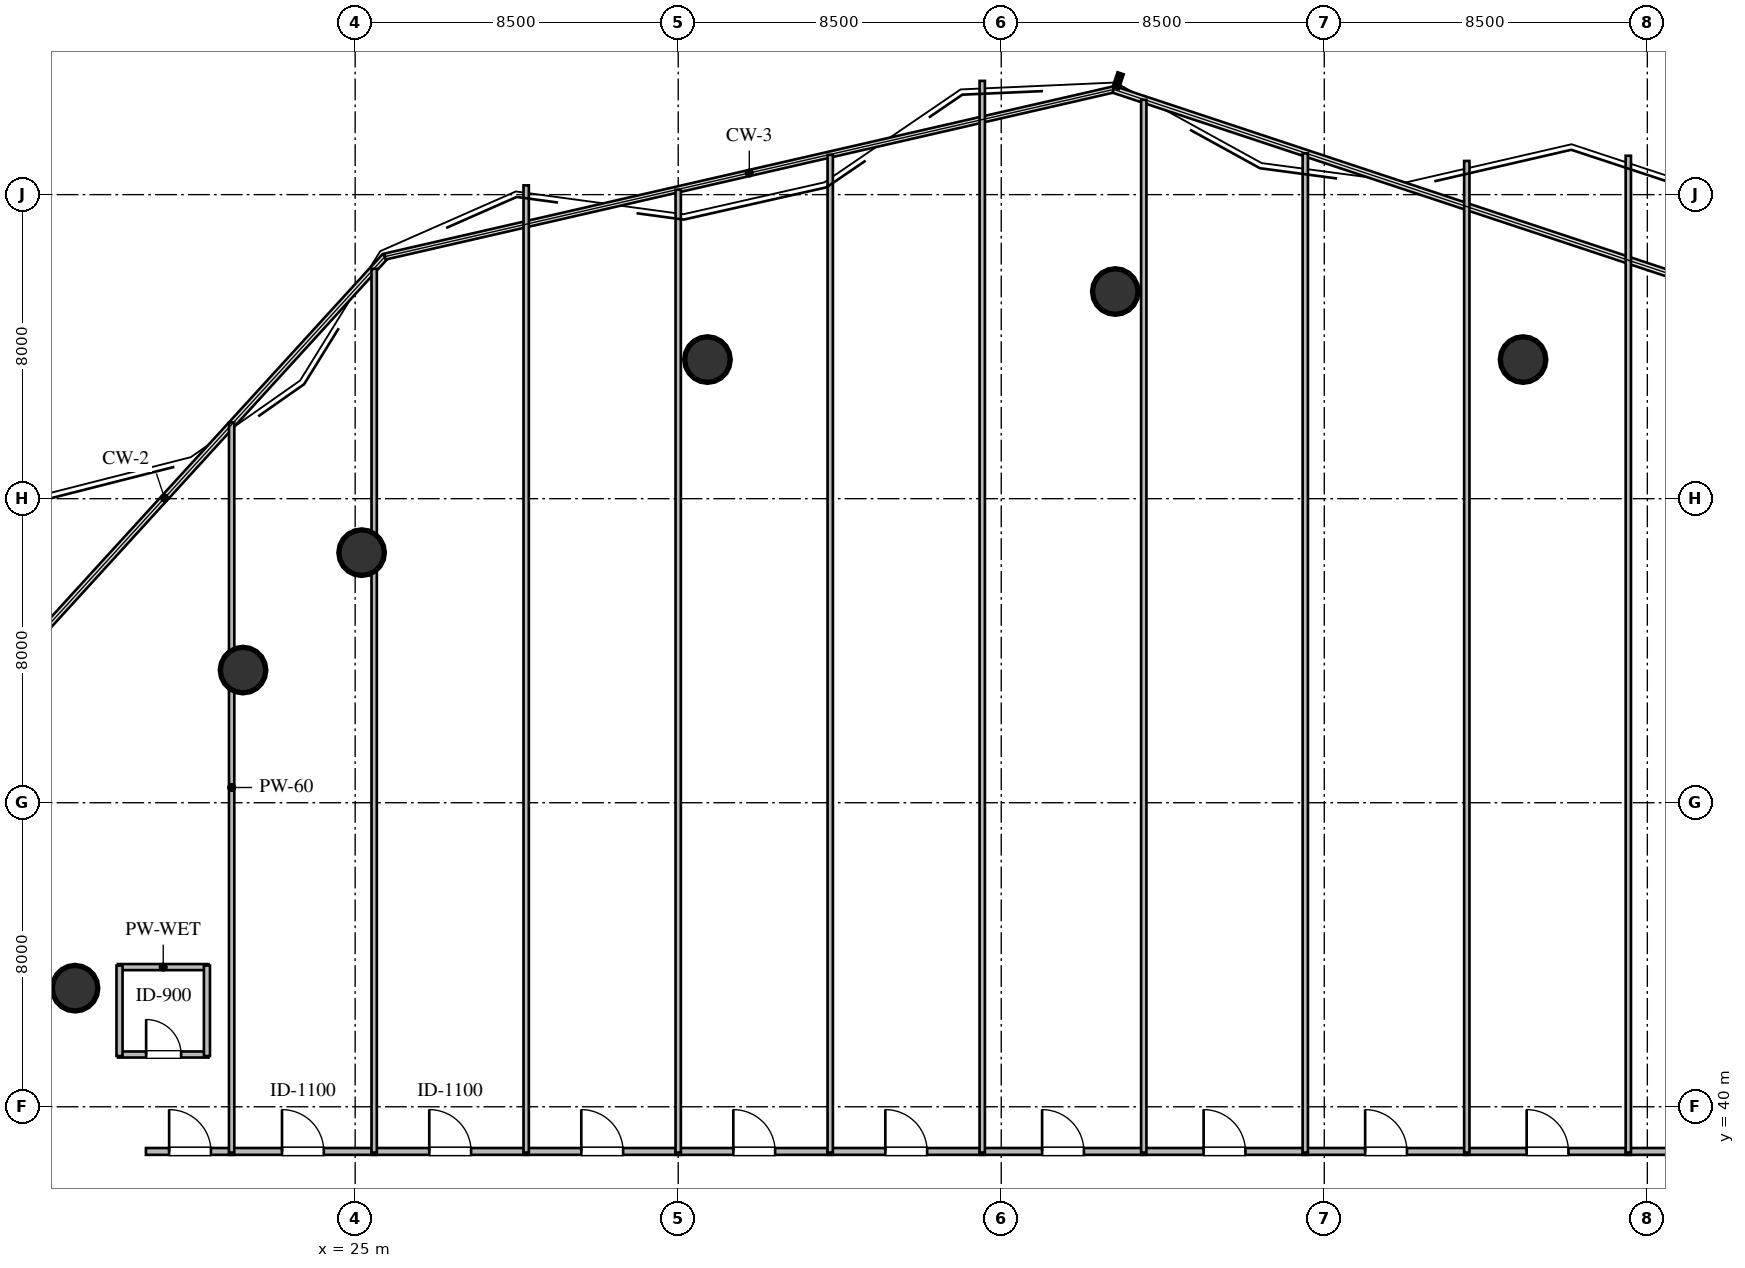
"""IFC4 building model, lengths in metres.
Left out: names, types, materials, properties, quantities, classifications, styles, units other than length and angle.
Written with IfcOpenShell. Run it as: python <this file> out.ifc"""

import sys

from ifc_helpers import new_model, si_unit, direction, frame, frame_2d, origin, origin_2d, place, context, subcontext, project, spatial, rectangle, circle, extrude, element, fill, save


model = new_model("IFC4")
c1 = context("Model", 3, precision=1e-05, world=origin(), true_north=direction((0.0, 1.0)))
c2 = subcontext(c1, "Body", "Model", "MODEL_VIEW")
j1 = project(units=[si_unit("LENGTHUNIT", "METRE"), si_unit("PLANEANGLEUNIT", "RADIAN")], contexts=[c1])
p1 = place(None, origin())
s1 = spatial("IfcSite", under=j1, at=p1, CompositionType="ELEMENT")
p2 = place(p1, origin())
s2 = spatial("IfcBuilding", under=s1, at=p2, CompositionType="ELEMENT")
p3 = place(p2, frame((0.0, 0.0, 163.8)))
s3 = spatial("IfcBuildingStorey", under=s2, at=p3, CompositionType="ELEMENT", Elevation=163.8)
for number, where, z_axis, x_axis in (
    (1, (55.73, 59.66, 0.0), (0.0, 0.0, 1.0), (1.0, 0.0, 0.0)),
    (2, (45.0, 61.45, 0.0), (0.0, 0.0, 1.0), (1.0, 0.0, 0.0)),
    (3, (34.27, 59.66, 0.0), (0.0, 0.0, 1.0), (1.0, 0.0, 0.0)),
    (4, (25.17, 54.58, 0.0), (0.0, 0.0, 1.0), (1.0, 0.0, 0.0)),
    (5, (22.05, 51.49, 0.0), (0.0, 0.0, 1.0), (1.0, 0.0, 0.0)),
    (6, (17.63, 43.12, 0.0), (0.0, 0.0, 1.0), (1.0, 0.0, 0.0)),
):
    element("IfcColumn", number, at=place(p3, frame(where, z_axis=z_axis, x_axis=x_axis)), inside=s3, PredefinedType="COLUMN", context=c2, shape_type="SweptSolid", body=[
        extrude(circle(Radius=0.6, at=origin_2d()), origin(), (0.0, 0.0, 1.0), 3.6),
    ])
p4 = place(p3, frame((18.76, 41.375, 0.0), z_axis=(0.0, 0.0, 1.0), x_axis=(1.0, 0.0, 0.0)))
e7 = element("IfcWall", 7, at=p4, inside=s3, PredefinedType="PLUMBINGWALL", context=c2, shape_type="SweptSolid", body=[
    extrude(rectangle(XDim=2.38, YDim=0.16, at=frame_2d((1.19, 0.0))), origin(), (0.0, 0.0, 1.0), 3.36),
])
p5 = place(p4, frame((0.74, 0.0, 0.0)))
e8 = element("IfcOpeningElement", 8, at=p5, cuts=e7, PredefinedType="OPENING", context=c2, shape_type="SweptSolid", body=[
    extrude(rectangle(XDim=0.92, YDim=2.1, at=frame_2d((0.46, 1.05))), frame((0.0, 0.09, 0.0), z_axis=(0.0, -1.0, 0.0), x_axis=(1.0, 0.0, 0.0)), (0.0, 0.0, 1.0), 0.18),
])
p6 = place(p3, frame((18.76, 43.675, 0.0), z_axis=(0.0, 0.0, 1.0), x_axis=(1.0, 0.0, 0.0)))
e9 = element("IfcWall", 9, at=p6, inside=s3, PredefinedType="PLUMBINGWALL", context=c2, shape_type="SweptSolid", body=[
    extrude(rectangle(XDim=2.38, YDim=0.16, at=frame_2d((1.19, 0.0))), origin(), (0.0, 0.0, 1.0), 3.36),
])
for number, where, z_axis, x_axis in (
    (10, (18.8, 41.335, 0.0), (0.0, 0.0, 1.0), (0.0, 1.0, 0.0)),
    (11, (21.1, 41.335, 0.0), (0.0, 0.0, 1.0), (0.0, 1.0, 0.0)),
):
    element("IfcWall", number, at=place(p3, frame(where, z_axis=z_axis, x_axis=x_axis)), inside=s3, PredefinedType="PLUMBINGWALL", context=c2, shape_type="SweptSolid", body=[
        extrude(rectangle(XDim=2.38, YDim=0.16, at=frame_2d((1.19, 0.0))), origin(), (0.0, 0.0, 1.0), 3.36),
    ])
p7 = place(p3, frame((19.495, 38.825, 0.0), z_axis=(0.0, 0.0, 1.0), x_axis=(1.0, 0.0, 0.0)))
e12 = element("IfcWall", 12, at=p7, inside=s3, PredefinedType="PARTITIONING", context=c2, shape_type="SweptSolid", body=[
    extrude(rectangle(XDim=2.32, YDim=0.18, at=frame_2d((1.16, 0.0))), origin(), (0.0, 0.0, 1.0), 3.36),
])
p8 = place(p7, frame((0.61, 0.0, 0.0)))
e13 = element("IfcOpeningElement", 13, at=p8, cuts=e12, PredefinedType="OPENING", context=c2, shape_type="SweptSolid", body=[
    extrude(rectangle(XDim=1.1, YDim=2.1, at=frame_2d((0.55, 1.05))), frame((0.0, 0.1, 0.0), z_axis=(0.0, -1.0, 0.0), x_axis=(1.0, 0.0, 0.0)), (0.0, 0.0, 1.0), 0.2),
])
p9 = place(p3, frame((21.685, 38.825, 0.0), z_axis=(0.0, 0.0, 1.0), x_axis=(1.0, 0.0, 0.0)))
e14 = element("IfcWall", 14, at=p9, inside=s3, PredefinedType="PARTITIONING", context=c2, shape_type="SweptSolid", body=[
    extrude(rectangle(XDim=3.88, YDim=0.18, at=frame_2d((1.94, 0.0))), origin(), (0.0, 0.0, 1.0), 3.36),
])
p10 = place(p9, frame((1.39, 0.0, 0.0)))
e15 = element("IfcOpeningElement", 15, at=p10, cuts=e14, PredefinedType="OPENING", context=c2, shape_type="SweptSolid", body=[
    extrude(rectangle(XDim=1.1, YDim=2.1, at=frame_2d((0.55, 1.05))), frame((0.0, 0.1, 0.0), z_axis=(0.0, -1.0, 0.0), x_axis=(1.0, 0.0, 0.0)), (0.0, 0.0, 1.0), 0.2),
])
p11 = place(p3, frame((25.435, 38.825, 0.0), z_axis=(0.0, 0.0, 1.0), x_axis=(1.0, 0.0, 0.0)))
e16 = element("IfcWall", 16, at=p11, inside=s3, PredefinedType="PARTITIONING", context=c2, shape_type="SweptSolid", body=[
    extrude(rectangle(XDim=4.13, YDim=0.18, at=frame_2d((2.065, 0.0))), origin(), (0.0, 0.0, 1.0), 3.36),
])
p12 = place(p11, frame((1.515, 0.0, 0.0)))
e17 = element("IfcOpeningElement", 17, at=p12, cuts=e16, PredefinedType="OPENING", context=c2, shape_type="SweptSolid", body=[
    extrude(rectangle(XDim=1.1, YDim=2.1, at=frame_2d((0.55, 1.05))), frame((0.0, 0.1, 0.0), z_axis=(0.0, -1.0, 0.0), x_axis=(1.0, 0.0, 0.0)), (0.0, 0.0, 1.0), 0.2),
])
p13 = place(p3, frame((29.435, 38.825, 0.0), z_axis=(0.0, 0.0, 1.0), x_axis=(1.0, 0.0, 0.0)))
e18 = element("IfcWall", 18, at=p13, inside=s3, PredefinedType="PARTITIONING", context=c2, shape_type="SweptSolid", body=[
    extrude(rectangle(XDim=4.13, YDim=0.18, at=frame_2d((2.065, 0.0))), origin(), (0.0, 0.0, 1.0), 3.36),
])
p14 = place(p13, frame((1.515, 0.0, 0.0)))
e19 = element("IfcOpeningElement", 19, at=p14, cuts=e18, PredefinedType="OPENING", context=c2, shape_type="SweptSolid", body=[
    extrude(rectangle(XDim=1.1, YDim=2.1, at=frame_2d((0.55, 1.05))), frame((0.0, 0.1, 0.0), z_axis=(0.0, -1.0, 0.0), x_axis=(1.0, 0.0, 0.0)), (0.0, 0.0, 1.0), 0.2),
])
p15 = place(p3, frame((33.435, 38.825, 0.0), z_axis=(0.0, 0.0, 1.0), x_axis=(1.0, 0.0, 0.0)))
e20 = element("IfcWall", 20, at=p15, inside=s3, PredefinedType="PARTITIONING", context=c2, shape_type="SweptSolid", body=[
    extrude(rectangle(XDim=4.13, YDim=0.18, at=frame_2d((2.065, 0.0))), origin(), (0.0, 0.0, 1.0), 3.36),
])
p16 = place(p15, frame((1.515, 0.0, 0.0)))
e21 = element("IfcOpeningElement", 21, at=p16, cuts=e20, PredefinedType="OPENING", context=c2, shape_type="SweptSolid", body=[
    extrude(rectangle(XDim=1.1, YDim=2.1, at=frame_2d((0.55, 1.05))), frame((0.0, 0.1, 0.0), z_axis=(0.0, -1.0, 0.0), x_axis=(1.0, 0.0, 0.0)), (0.0, 0.0, 1.0), 0.2),
])
p17 = place(p3, frame((37.435, 38.825, 0.0), z_axis=(0.0, 0.0, 1.0), x_axis=(1.0, 0.0, 0.0)))
e22 = element("IfcWall", 22, at=p17, inside=s3, PredefinedType="PARTITIONING", context=c2, shape_type="SweptSolid", body=[
    extrude(rectangle(XDim=4.13, YDim=0.18, at=frame_2d((2.065, 0.0))), origin(), (0.0, 0.0, 1.0), 3.36),
])
p18 = place(p17, frame((1.515, 0.0, 0.0)))
e23 = element("IfcOpeningElement", 23, at=p18, cuts=e22, PredefinedType="OPENING", context=c2, shape_type="SweptSolid", body=[
    extrude(rectangle(XDim=1.1, YDim=2.1, at=frame_2d((0.55, 1.05))), frame((0.0, 0.1, 0.0), z_axis=(0.0, -1.0, 0.0), x_axis=(1.0, 0.0, 0.0)), (0.0, 0.0, 1.0), 0.2),
])
p19 = place(p3, frame((41.435, 38.825, 0.0), z_axis=(0.0, 0.0, 1.0), x_axis=(1.0, 0.0, 0.0)))
e24 = element("IfcWall", 24, at=p19, inside=s3, PredefinedType="PARTITIONING", context=c2, shape_type="SweptSolid", body=[
    extrude(rectangle(XDim=4.38, YDim=0.18, at=frame_2d((2.19, 0.0))), origin(), (0.0, 0.0, 1.0), 3.36),
])
p20 = place(p19, frame((1.64, 0.0, 0.0)))
e25 = element("IfcOpeningElement", 25, at=p20, cuts=e24, PredefinedType="OPENING", context=c2, shape_type="SweptSolid", body=[
    extrude(rectangle(XDim=1.1, YDim=2.1, at=frame_2d((0.55, 1.05))), frame((0.0, 0.1, 0.0), z_axis=(0.0, -1.0, 0.0), x_axis=(1.0, 0.0, 0.0)), (0.0, 0.0, 1.0), 0.2),
])
p21 = place(p3, frame((45.685, 38.825, 0.0), z_axis=(0.0, 0.0, 1.0), x_axis=(1.0, 0.0, 0.0)))
e26 = element("IfcWall", 26, at=p21, inside=s3, PredefinedType="PARTITIONING", context=c2, shape_type="SweptSolid", body=[
    extrude(rectangle(XDim=4.38, YDim=0.18, at=frame_2d((2.19, 0.0))), origin(), (0.0, 0.0, 1.0), 3.36),
])
p22 = place(p21, frame((1.64, 0.0, 0.0)))
e27 = element("IfcOpeningElement", 27, at=p22, cuts=e26, PredefinedType="OPENING", context=c2, shape_type="SweptSolid", body=[
    extrude(rectangle(XDim=1.1, YDim=2.1, at=frame_2d((0.55, 1.05))), frame((0.0, 0.1, 0.0), z_axis=(0.0, -1.0, 0.0), x_axis=(1.0, 0.0, 0.0)), (0.0, 0.0, 1.0), 0.2),
])
p23 = place(p3, frame((49.935, 38.825, 0.0), z_axis=(0.0, 0.0, 1.0), x_axis=(1.0, 0.0, 0.0)))
e28 = element("IfcWall", 28, at=p23, inside=s3, PredefinedType="PARTITIONING", context=c2, shape_type="SweptSolid", body=[
    extrude(rectangle(XDim=4.38, YDim=0.18, at=frame_2d((2.19, 0.0))), origin(), (0.0, 0.0, 1.0), 3.36),
])
p24 = place(p23, frame((1.64, 0.0, 0.0)))
e29 = element("IfcOpeningElement", 29, at=p24, cuts=e28, PredefinedType="OPENING", context=c2, shape_type="SweptSolid", body=[
    extrude(rectangle(XDim=1.1, YDim=2.1, at=frame_2d((0.55, 1.05))), frame((0.0, 0.1, 0.0), z_axis=(0.0, -1.0, 0.0), x_axis=(1.0, 0.0, 0.0)), (0.0, 0.0, 1.0), 0.2),
])
p25 = place(p3, frame((54.185, 38.825, 0.0), z_axis=(0.0, 0.0, 1.0), x_axis=(1.0, 0.0, 0.0)))
e30 = element("IfcWall", 30, at=p25, inside=s3, PredefinedType="PARTITIONING", context=c2, shape_type="SweptSolid", body=[
    extrude(rectangle(XDim=4.38, YDim=0.18, at=frame_2d((2.19, 0.0))), origin(), (0.0, 0.0, 1.0), 3.36),
])
p26 = place(p25, frame((1.64, 0.0, 0.0)))
e31 = element("IfcOpeningElement", 31, at=p26, cuts=e30, PredefinedType="OPENING", context=c2, shape_type="SweptSolid", body=[
    extrude(rectangle(XDim=1.1, YDim=2.1, at=frame_2d((0.55, 1.05))), frame((0.0, 0.1, 0.0), z_axis=(0.0, -1.0, 0.0), x_axis=(1.0, 0.0, 0.0)), (0.0, 0.0, 1.0), 0.2),
])
p27 = place(p3, frame((58.435, 38.825, 0.0), z_axis=(0.0, 0.0, 1.0), x_axis=(1.0, 0.0, 0.0)))
e32 = element("IfcWall", 32, at=p27, inside=s3, PredefinedType="PARTITIONING", context=c2, shape_type="SweptSolid", body=[
    extrude(rectangle(XDim=3.88, YDim=0.18, at=frame_2d((1.94, 0.0))), origin(), (0.0, 0.0, 1.0), 3.36),
])
p28 = place(p27, frame((1.39, 0.0, 0.0)))
e33 = element("IfcOpeningElement", 33, at=p28, cuts=e32, PredefinedType="OPENING", context=c2, shape_type="SweptSolid", body=[
    extrude(rectangle(XDim=1.1, YDim=2.1, at=frame_2d((0.55, 1.05))), frame((0.0, 0.1, 0.0), z_axis=(0.0, -1.0, 0.0), x_axis=(1.0, 0.0, 0.0)), (0.0, 0.0, 1.0), 0.2),
])
p29 = place(p3, frame((21.75, 58.006, 0.0), z_axis=(0.0, 0.0, 1.0), x_axis=(0.0, -1.0, 0.0)))
e34 = element("IfcWall", 34, at=p29, inside=s3, PredefinedType="PARTITIONING", context=c2, shape_type="SweptSolid", body=[
    extrude(rectangle(XDim=19.211, YDim=0.14, at=frame_2d((9.605, 0.0))), origin(), (0.0, 0.0, 1.0), 2.89),
])
p30 = place(p3, frame((25.5, 62.049, 0.0), z_axis=(0.0, 0.0, 1.0), x_axis=(0.0, -1.0, 0.0)))
e35 = element("IfcWall", 35, at=p30, inside=s3, PredefinedType="PARTITIONING", context=c2, shape_type="SweptSolid", body=[
    extrude(rectangle(XDim=23.254, YDim=0.14, at=frame_2d((11.627, 0.0))), origin(), (0.0, 0.0, 1.0), 2.89),
])
p31 = place(p3, frame((29.5, 64.244, 0.0), z_axis=(0.0, 0.0, 1.0), x_axis=(0.0, -1.0, 0.0)))
e36 = element("IfcWall", 36, at=p31, inside=s3, PredefinedType="PARTITIONING", context=c2, shape_type="SweptSolid", body=[
    extrude(rectangle(XDim=25.449, YDim=0.14, at=frame_2d((12.725, 0.0))), origin(), (0.0, 0.0, 1.0), 3.36),
])
p32 = place(p3, frame((33.5, 64.13, 0.0), z_axis=(0.0, 0.0, 1.0), x_axis=(0.0, -1.0, 0.0)))
e37 = element("IfcWall", 37, at=p32, inside=s3, PredefinedType="PARTITIONING", context=c2, shape_type="SweptSolid", body=[
    extrude(rectangle(XDim=25.335, YDim=0.14, at=frame_2d((12.667, 0.0))), origin(), (0.0, 0.0, 1.0), 3.36),
])
p33 = place(p3, frame((37.5, 65.047, 0.0), z_axis=(0.0, 0.0, 1.0), x_axis=(0.0, -1.0, 0.0)))
e38 = element("IfcWall", 38, at=p33, inside=s3, PredefinedType="PARTITIONING", context=c2, shape_type="SweptSolid", body=[
    extrude(rectangle(XDim=26.252, YDim=0.14, at=frame_2d((13.126, 0.0))), origin(), (0.0, 0.0, 1.0), 3.36),
])
p34 = place(p3, frame((41.5, 66.993, 0.0), z_axis=(0.0, 0.0, 1.0), x_axis=(0.0, -1.0, 0.0)))
e39 = element("IfcWall", 39, at=p34, inside=s3, PredefinedType="PARTITIONING", context=c2, shape_type="SweptSolid", body=[
    extrude(rectangle(XDim=28.198, YDim=0.14, at=frame_2d((14.099, 0.0))), origin(), (0.0, 0.0, 1.0), 3.36),
])
p35 = place(p3, frame((45.75, 66.495, 0.0), z_axis=(0.0, 0.0, 1.0), x_axis=(0.0, -1.0, 0.0)))
e40 = element("IfcWall", 40, at=p35, inside=s3, PredefinedType="PARTITIONING", context=c2, shape_type="SweptSolid", body=[
    extrude(rectangle(XDim=27.7, YDim=0.14, at=frame_2d((13.85, 0.0))), origin(), (0.0, 0.0, 1.0), 3.36),
])
p36 = place(p3, frame((50.0, 65.085, 0.0), z_axis=(0.0, 0.0, 1.0), x_axis=(0.0, -1.0, 0.0)))
e41 = element("IfcWall", 41, at=p36, inside=s3, PredefinedType="PARTITIONING", context=c2, shape_type="SweptSolid", body=[
    extrude(rectangle(XDim=26.291, YDim=0.14, at=frame_2d((13.145, 0.0))), origin(), (0.0, 0.0, 1.0), 3.36),
])
p37 = place(p3, frame((54.25, 64.886, 0.0), z_axis=(0.0, 0.0, 1.0), x_axis=(0.0, -1.0, 0.0)))
e42 = element("IfcWall", 42, at=p37, inside=s3, PredefinedType="PARTITIONING", context=c2, shape_type="SweptSolid", body=[
    extrude(rectangle(XDim=26.091, YDim=0.14, at=frame_2d((13.045, 0.0))), origin(), (0.0, 0.0, 1.0), 3.36),
])
p38 = place(p3, frame((58.5, 65.023, 0.0), z_axis=(0.0, 0.0, 1.0), x_axis=(0.0, -1.0, 0.0)))
e43 = element("IfcWall", 43, at=p38, inside=s3, PredefinedType="PARTITIONING", context=c2, shape_type="SweptSolid", body=[
    extrude(rectangle(XDim=26.228, YDim=0.14, at=frame_2d((13.114, 0.0))), origin(), (0.0, 0.0, 1.0), 2.996),
])
p39 = place(p5, origin())
e44 = element("IfcDoor", 44, at=p39, inside=s3, OperationType="SINGLE_SWING_LEFT", PredefinedType="DOOR", context=c2, shape_type="SweptSolid", body=[
    extrude(rectangle(XDim=0.92, YDim=2.1, at=frame_2d((0.46, 1.05))), frame((0.0, 0.025, 0.0), z_axis=(0.0, -1.0, 0.0), x_axis=(1.0, 0.0, 0.0)), (0.0, 0.0, 1.0), 0.05),
])
fill(e8, e44)
p40 = place(p8, origin())
e45 = element("IfcDoor", 45, at=p40, inside=s3, OperationType="SINGLE_SWING_LEFT", PredefinedType="DOOR", context=c2, shape_type="SweptSolid", body=[
    extrude(rectangle(XDim=1.1, YDim=2.1, at=frame_2d((0.55, 1.05))), frame((0.0, 0.025, 0.0), z_axis=(0.0, -1.0, 0.0), x_axis=(1.0, 0.0, 0.0)), (0.0, 0.0, 1.0), 0.05),
])
fill(e13, e45)
p41 = place(p10, origin())
e46 = element("IfcDoor", 46, at=p41, inside=s3, OperationType="SINGLE_SWING_LEFT", PredefinedType="DOOR", context=c2, shape_type="SweptSolid", body=[
    extrude(rectangle(XDim=1.1, YDim=2.1, at=frame_2d((0.55, 1.05))), frame((0.0, 0.025, 0.0), z_axis=(0.0, -1.0, 0.0), x_axis=(1.0, 0.0, 0.0)), (0.0, 0.0, 1.0), 0.05),
])
fill(e15, e46)
p42 = place(p12, origin())
e47 = element("IfcDoor", 47, at=p42, inside=s3, OperationType="SINGLE_SWING_LEFT", PredefinedType="DOOR", context=c2, shape_type="SweptSolid", body=[
    extrude(rectangle(XDim=1.1, YDim=2.1, at=frame_2d((0.55, 1.05))), frame((0.0, 0.025, 0.0), z_axis=(0.0, -1.0, 0.0), x_axis=(1.0, 0.0, 0.0)), (0.0, 0.0, 1.0), 0.05),
])
fill(e17, e47)
p43 = place(p14, origin())
e48 = element("IfcDoor", 48, at=p43, inside=s3, OperationType="SINGLE_SWING_LEFT", PredefinedType="DOOR", context=c2, shape_type="SweptSolid", body=[
    extrude(rectangle(XDim=1.1, YDim=2.1, at=frame_2d((0.55, 1.05))), frame((0.0, 0.025, 0.0), z_axis=(0.0, -1.0, 0.0), x_axis=(1.0, 0.0, 0.0)), (0.0, 0.0, 1.0), 0.05),
])
fill(e19, e48)
p44 = place(p16, origin())
e49 = element("IfcDoor", 49, at=p44, inside=s3, OperationType="SINGLE_SWING_LEFT", PredefinedType="DOOR", context=c2, shape_type="SweptSolid", body=[
    extrude(rectangle(XDim=1.1, YDim=2.1, at=frame_2d((0.55, 1.05))), frame((0.0, 0.025, 0.0), z_axis=(0.0, -1.0, 0.0), x_axis=(1.0, 0.0, 0.0)), (0.0, 0.0, 1.0), 0.05),
])
fill(e21, e49)
p45 = place(p18, origin())
e50 = element("IfcDoor", 50, at=p45, inside=s3, OperationType="SINGLE_SWING_LEFT", PredefinedType="DOOR", context=c2, shape_type="SweptSolid", body=[
    extrude(rectangle(XDim=1.1, YDim=2.1, at=frame_2d((0.55, 1.05))), frame((0.0, 0.025, 0.0), z_axis=(0.0, -1.0, 0.0), x_axis=(1.0, 0.0, 0.0)), (0.0, 0.0, 1.0), 0.05),
])
fill(e23, e50)
p46 = place(p20, origin())
e51 = element("IfcDoor", 51, at=p46, inside=s3, OperationType="SINGLE_SWING_LEFT", PredefinedType="DOOR", context=c2, shape_type="SweptSolid", body=[
    extrude(rectangle(XDim=1.1, YDim=2.1, at=frame_2d((0.55, 1.05))), frame((0.0, 0.025, 0.0), z_axis=(0.0, -1.0, 0.0), x_axis=(1.0, 0.0, 0.0)), (0.0, 0.0, 1.0), 0.05),
])
fill(e25, e51)
p47 = place(p22, origin())
e52 = element("IfcDoor", 52, at=p47, inside=s3, OperationType="SINGLE_SWING_LEFT", PredefinedType="DOOR", context=c2, shape_type="SweptSolid", body=[
    extrude(rectangle(XDim=1.1, YDim=2.1, at=frame_2d((0.55, 1.05))), frame((0.0, 0.025, 0.0), z_axis=(0.0, -1.0, 0.0), x_axis=(1.0, 0.0, 0.0)), (0.0, 0.0, 1.0), 0.05),
])
fill(e27, e52)
p48 = place(p24, origin())
e53 = element("IfcDoor", 53, at=p48, inside=s3, OperationType="SINGLE_SWING_LEFT", PredefinedType="DOOR", context=c2, shape_type="SweptSolid", body=[
    extrude(rectangle(XDim=1.1, YDim=2.1, at=frame_2d((0.55, 1.05))), frame((0.0, 0.025, 0.0), z_axis=(0.0, -1.0, 0.0), x_axis=(1.0, 0.0, 0.0)), (0.0, 0.0, 1.0), 0.05),
])
fill(e29, e53)
p49 = place(p26, origin())
e54 = element("IfcDoor", 54, at=p49, inside=s3, OperationType="SINGLE_SWING_LEFT", PredefinedType="DOOR", context=c2, shape_type="SweptSolid", body=[
    extrude(rectangle(XDim=1.1, YDim=2.1, at=frame_2d((0.55, 1.05))), frame((0.0, 0.025, 0.0), z_axis=(0.0, -1.0, 0.0), x_axis=(1.0, 0.0, 0.0)), (0.0, 0.0, 1.0), 0.05),
])
fill(e31, e54)
save(model, sys.argv[1])
